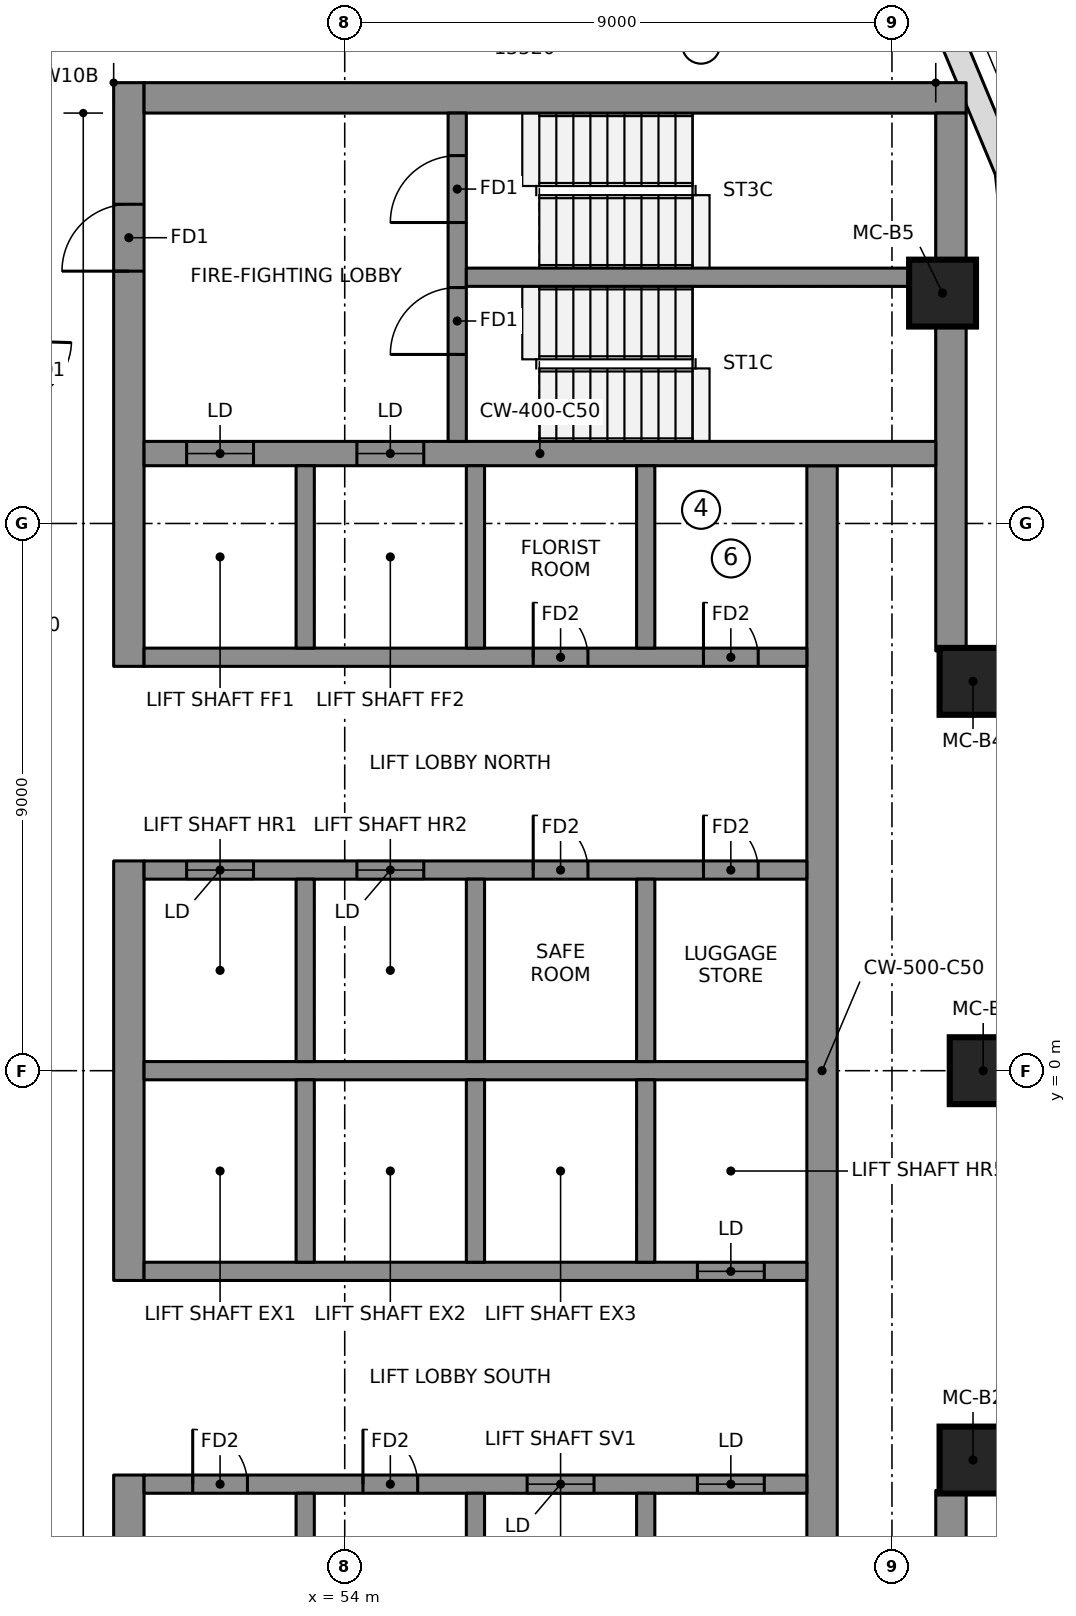
"""IFC4 building model, lengths in metres.
Left out: names, types, materials, properties, quantities, classifications, styles, units other than length and angle.
Written with IfcOpenShell. Run it as: python <this file> out.ifc"""

import sys

from ifc_helpers import new_model, si_unit, direction, frame, frame_2d, origin, origin_2d, place, context, subcontext, project, spatial, polyline, rectangle, outline, extrude, element, fill, save


model = new_model("IFC4")
c1 = context("Model", 3, precision=1e-05, world=origin(), true_north=direction((0.0, 1.0)))
c2 = subcontext(c1, "Body", "Model", "MODEL_VIEW")
j1 = project(units=[si_unit("LENGTHUNIT", "METRE"), si_unit("PLANEANGLEUNIT", "RADIAN")], contexts=[c1])
p1 = place(None, origin())
s1 = spatial("IfcSite", under=j1, at=p1, CompositionType="ELEMENT")
p2 = place(p1, origin())
s2 = spatial("IfcBuilding", under=s1, at=p2, CompositionType="ELEMENT")
p3 = place(p2, frame((0.0, 0.0, 296.3)))
s3 = spatial("IfcBuildingStorey", under=s2, at=p3, CompositionType="ELEMENT", Elevation=296.3)
p4 = place(p3, frame((50.45, 6.65, 0.0), z_axis=(0.0, 0.0, 1.0), x_axis=(0.0, 1.0, 0.0)))
e1 = element("IfcWall", 1, at=p4, inside=s3, PredefinedType="SHEAR", context=c2, shape_type="SweptSolid", body=[
    extrude(rectangle(XDim=9.6, YDim=0.5, at=frame_2d((4.8, 0.0))), origin(), (0.0, 0.0, 1.0), 3.55),
])
p5 = place(p4, frame((6.5, 0.0, 0.0)))
e2 = element("IfcOpeningElement", 2, at=p5, cuts=e1, PredefinedType="OPENING", context=c2, shape_type="SweptSolid", body=[
    extrude(rectangle(XDim=1.1, YDim=2.1, at=frame_2d((0.55, 1.05))), frame((0.0, 0.26, 0.0), z_axis=(0.0, -1.0, 0.0), x_axis=(1.0, 0.0, 0.0)), (0.0, 0.0, 1.0), 0.52),
])
p6 = place(p3, frame((50.45, -3.45, 0.0), z_axis=(0.0, 0.0, 1.0), x_axis=(0.0, 1.0, 0.0)))
e3 = element("IfcWall", 3, at=p6, inside=s3, PredefinedType="SHEAR", context=c2, shape_type="SweptSolid", body=[
    extrude(rectangle(XDim=6.9, YDim=0.5, at=frame_2d((3.45, 0.0))), origin(), (0.0, 0.0, 1.0), 3.55),
])
p7 = place(p3, frame((50.45, -16.25, 0.0), z_axis=(0.0, 0.0, 1.0), x_axis=(0.0, 1.0, 0.0)))
e4 = element("IfcWall", 4, at=p7, inside=s3, PredefinedType="SHEAR", context=c2, shape_type="SweptSolid", body=[
    extrude(rectangle(XDim=9.6, YDim=0.5, at=frame_2d((4.8, 0.0))), origin(), (0.0, 0.0, 1.0), 3.55),
])
p8 = place(p7, frame((2.0, 0.0, 0.0)))
e5 = element("IfcOpeningElement", 5, at=p8, cuts=e4, PredefinedType="OPENING", context=c2, shape_type="SweptSolid", body=[
    extrude(rectangle(XDim=1.1, YDim=2.1, at=frame_2d((0.55, 1.05))), frame((0.0, 0.26, 0.0), z_axis=(0.0, -1.0, 0.0), x_axis=(1.0, 0.0, 0.0)), (0.0, 0.0, 1.0), 0.52),
])
p9 = place(p3, frame((50.7, 16.0, 0.0), z_axis=(0.0, 0.0, 1.0), x_axis=(1.0, 0.0, 0.0)))
e6 = element("IfcWall", 6, at=p9, inside=s3, PredefinedType="SHEAR", context=c2, shape_type="SweptSolid", body=[
    extrude(rectangle(XDim=13.52, YDim=0.5, at=frame_2d((6.76, 0.0))), origin(), (0.0, 0.0, 1.0), 3.55),
])
for number, where, z_axis, x_axis in (
    (7, (63.97, 6.903, 0.0), (0.0, 0.0, 1.0), (0.0, 1.0, 0.0)),
    (8, (63.97, -15.75, 0.0), (0.0, 0.0, 1.0), (0.0, 1.0, 0.0)),
):
    element("IfcWall", number, at=place(p3, frame(where, z_axis=z_axis, x_axis=x_axis)), inside=s3, PredefinedType="SHEAR", context=c2, shape_type="SweptSolid", body=[
        extrude(rectangle(XDim=8.847, YDim=0.5, at=frame_2d((4.423, 0.0))), origin(), (0.0, 0.0, 1.0), 3.55),
    ])
p10 = place(p3, frame((61.85, -9.95, 0.0), z_axis=(0.0, 0.0, 1.0), x_axis=(0.0, 1.0, 0.0)))
e9 = element("IfcWall", 9, at=p10, inside=s3, PredefinedType="SHEAR", context=c2, shape_type="SweptSolid", body=[
    extrude(rectangle(XDim=19.9, YDim=0.5, at=frame_2d((9.95, 0.0))), origin(), (0.0, 0.0, 1.0), 3.55),
])
p11 = place(p3, frame((50.7, 10.15, 0.0), z_axis=(0.0, 0.0, 1.0), x_axis=(1.0, 0.0, 0.0)))
e10 = element("IfcWall", 10, at=p11, inside=s3, PredefinedType="SHEAR", context=c2, shape_type="SweptSolid", body=[
    extrude(rectangle(XDim=13.02, YDim=0.4, at=frame_2d((6.51, 0.0))), origin(), (0.0, 0.0, 1.0), 3.55),
])
p12 = place(p11, frame((0.7, 0.0, 0.0)))
e11 = element("IfcOpeningElement", 11, at=p12, cuts=e10, PredefinedType="OPENING", context=c2, shape_type="SweptSolid", body=[
    extrude(rectangle(XDim=1.1, YDim=2.1, at=frame_2d((0.55, 1.05))), frame((0.0, 0.21, 0.0), z_axis=(0.0, -1.0, 0.0), x_axis=(1.0, 0.0, 0.0)), (0.0, 0.0, 1.0), 0.42),
])
p13 = place(p11, frame((3.5, 0.0, 0.0)))
e12 = element("IfcOpeningElement", 12, at=p13, cuts=e10, PredefinedType="OPENING", context=c2, shape_type="SweptSolid", body=[
    extrude(rectangle(XDim=1.1, YDim=2.1, at=frame_2d((0.55, 1.05))), frame((0.0, 0.21, 0.0), z_axis=(0.0, -1.0, 0.0), x_axis=(1.0, 0.0, 0.0)), (0.0, 0.0, 1.0), 0.42),
])
p14 = place(p3, frame((50.7, 0.0, 0.0), z_axis=(0.0, 0.0, 1.0), x_axis=(1.0, 0.0, 0.0)))
e13 = element("IfcWall", 13, at=p14, inside=s3, PredefinedType="SHEAR", context=c2, shape_type="SweptSolid", body=[
    extrude(rectangle(XDim=10.9, YDim=0.3, at=frame_2d((5.45, 0.0))), origin(), (0.0, 0.0, 1.0), 3.55),
])
p15 = place(p3, frame((50.7, 3.3, 0.0), z_axis=(0.0, 0.0, 1.0), x_axis=(1.0, 0.0, 0.0)))
e14 = element("IfcWall", 14, at=p15, inside=s3, PredefinedType="SHEAR", context=c2, shape_type="SweptSolid", body=[
    extrude(rectangle(XDim=10.9, YDim=0.3, at=frame_2d((5.45, 0.0))), origin(), (0.0, 0.0, 1.0), 3.55),
])
p16 = place(p15, frame((0.7, 0.0, 0.0)))
e15 = element("IfcOpeningElement", 15, at=p16, cuts=e14, PredefinedType="OPENING", context=c2, shape_type="SweptSolid", body=[
    extrude(rectangle(XDim=1.1, YDim=2.1, at=frame_2d((0.55, 1.05))), frame((0.0, 0.16, 0.0), z_axis=(0.0, -1.0, 0.0), x_axis=(1.0, 0.0, 0.0)), (0.0, 0.0, 1.0), 0.32),
])
p17 = place(p15, frame((3.5, 0.0, 0.0)))
e16 = element("IfcOpeningElement", 16, at=p17, cuts=e14, PredefinedType="OPENING", context=c2, shape_type="SweptSolid", body=[
    extrude(rectangle(XDim=1.1, YDim=2.1, at=frame_2d((0.55, 1.05))), frame((0.0, 0.16, 0.0), z_axis=(0.0, -1.0, 0.0), x_axis=(1.0, 0.0, 0.0)), (0.0, 0.0, 1.0), 0.32),
])
p18 = place(p15, frame((6.4, 0.0, 0.0)))
e17 = element("IfcOpeningElement", 17, at=p18, cuts=e14, PredefinedType="OPENING", context=c2, shape_type="SweptSolid", body=[
    extrude(rectangle(XDim=0.9, YDim=2.1, at=frame_2d((0.45, 1.05))), frame((0.0, 0.16, 0.0), z_axis=(0.0, -1.0, 0.0), x_axis=(1.0, 0.0, 0.0)), (0.0, 0.0, 1.0), 0.32),
])
p19 = place(p15, frame((9.2, 0.0, 0.0)))
e18 = element("IfcOpeningElement", 18, at=p19, cuts=e14, PredefinedType="OPENING", context=c2, shape_type="SweptSolid", body=[
    extrude(rectangle(XDim=0.9, YDim=2.1, at=frame_2d((0.45, 1.05))), frame((0.0, 0.16, 0.0), z_axis=(0.0, -1.0, 0.0), x_axis=(1.0, 0.0, 0.0)), (0.0, 0.0, 1.0), 0.32),
])
p20 = place(p3, frame((50.7, 6.8, 0.0), z_axis=(0.0, 0.0, 1.0), x_axis=(1.0, 0.0, 0.0)))
e19 = element("IfcWall", 19, at=p20, inside=s3, PredefinedType="SHEAR", context=c2, shape_type="SweptSolid", body=[
    extrude(rectangle(XDim=10.9, YDim=0.3, at=frame_2d((5.45, 0.0))), origin(), (0.0, 0.0, 1.0), 3.55),
])
p21 = place(p20, frame((6.4, 0.0, 0.0)))
e20 = element("IfcOpeningElement", 20, at=p21, cuts=e19, PredefinedType="OPENING", context=c2, shape_type="SweptSolid", body=[
    extrude(rectangle(XDim=0.9, YDim=2.1, at=frame_2d((0.45, 1.05))), frame((0.0, 0.16, 0.0), z_axis=(0.0, -1.0, 0.0), x_axis=(1.0, 0.0, 0.0)), (0.0, 0.0, 1.0), 0.32),
])
p22 = place(p20, frame((9.2, 0.0, 0.0)))
e21 = element("IfcOpeningElement", 21, at=p22, cuts=e19, PredefinedType="OPENING", context=c2, shape_type="SweptSolid", body=[
    extrude(rectangle(XDim=0.9, YDim=2.1, at=frame_2d((0.45, 1.05))), frame((0.0, 0.16, 0.0), z_axis=(0.0, -1.0, 0.0), x_axis=(1.0, 0.0, 0.0)), (0.0, 0.0, 1.0), 0.32),
])
for number, where, z_axis, x_axis in (
    (22, (53.35, 0.15, 0.0), (0.0, 0.0, 1.0), (0.0, 1.0, 0.0)),
    (23, (53.35, 6.95, 0.0), (0.0, 0.0, 1.0), (0.0, 1.0, 0.0)),
    (24, (56.15, 0.15, 0.0), (0.0, 0.0, 1.0), (0.0, 1.0, 0.0)),
    (25, (56.15, 6.95, 0.0), (0.0, 0.0, 1.0), (0.0, 1.0, 0.0)),
    (26, (58.95, 0.15, 0.0), (0.0, 0.0, 1.0), (0.0, 1.0, 0.0)),
    (27, (58.95, 6.95, 0.0), (0.0, 0.0, 1.0), (0.0, 1.0, 0.0)),
):
    element("IfcWall", number, at=place(p3, frame(where, z_axis=z_axis, x_axis=x_axis)), inside=s3, PredefinedType="SHEAR", context=c2, shape_type="SweptSolid", body=[
        extrude(rectangle(XDim=3.0, YDim=0.3, at=frame_2d((1.5, 0.0))), origin(), (0.0, 0.0, 1.0), 3.55),
    ])
p23 = place(p3, frame((50.7, -3.3, 0.0), z_axis=(0.0, 0.0, 1.0), x_axis=(1.0, 0.0, 0.0)))
e28 = element("IfcWall", 28, at=p23, inside=s3, PredefinedType="SHEAR", context=c2, shape_type="SweptSolid", body=[
    extrude(rectangle(XDim=10.9, YDim=0.3, at=frame_2d((5.45, 0.0))), origin(), (0.0, 0.0, 1.0), 3.55),
])
p24 = place(p23, frame((9.1, 0.0, 0.0)))
e29 = element("IfcOpeningElement", 29, at=p24, cuts=e28, PredefinedType="OPENING", context=c2, shape_type="SweptSolid", body=[
    extrude(rectangle(XDim=1.1, YDim=2.1, at=frame_2d((0.55, 1.05))), frame((0.0, 0.16, 0.0), z_axis=(0.0, -1.0, 0.0), x_axis=(1.0, 0.0, 0.0)), (0.0, 0.0, 1.0), 0.32),
])
p25 = place(p3, frame((50.7, -6.8, 0.0), z_axis=(0.0, 0.0, 1.0), x_axis=(1.0, 0.0, 0.0)))
e30 = element("IfcWall", 30, at=p25, inside=s3, PredefinedType="SHEAR", context=c2, shape_type="SweptSolid", body=[
    extrude(rectangle(XDim=10.9, YDim=0.3, at=frame_2d((5.45, 0.0))), origin(), (0.0, 0.0, 1.0), 3.55),
])
p26 = place(p25, frame((6.3, 0.0, 0.0)))
e31 = element("IfcOpeningElement", 31, at=p26, cuts=e30, PredefinedType="OPENING", context=c2, shape_type="SweptSolid", body=[
    extrude(rectangle(XDim=1.1, YDim=2.1, at=frame_2d((0.55, 1.05))), frame((0.0, 0.16, 0.0), z_axis=(0.0, -1.0, 0.0), x_axis=(1.0, 0.0, 0.0)), (0.0, 0.0, 1.0), 0.32),
])
p27 = place(p25, frame((9.1, 0.0, 0.0)))
e32 = element("IfcOpeningElement", 32, at=p27, cuts=e30, PredefinedType="OPENING", context=c2, shape_type="SweptSolid", body=[
    extrude(rectangle(XDim=1.1, YDim=2.1, at=frame_2d((0.55, 1.05))), frame((0.0, 0.16, 0.0), z_axis=(0.0, -1.0, 0.0), x_axis=(1.0, 0.0, 0.0)), (0.0, 0.0, 1.0), 0.32),
])
p28 = place(p25, frame((0.8, 0.0, 0.0)))
e33 = element("IfcOpeningElement", 33, at=p28, cuts=e30, PredefinedType="OPENING", context=c2, shape_type="SweptSolid", body=[
    extrude(rectangle(XDim=0.9, YDim=2.1, at=frame_2d((0.45, 1.05))), frame((0.0, 0.16, 0.0), z_axis=(0.0, -1.0, 0.0), x_axis=(1.0, 0.0, 0.0)), (0.0, 0.0, 1.0), 0.32),
])
p29 = place(p25, frame((3.6, 0.0, 0.0)))
e34 = element("IfcOpeningElement", 34, at=p29, cuts=e30, PredefinedType="OPENING", context=c2, shape_type="SweptSolid", body=[
    extrude(rectangle(XDim=0.9, YDim=2.1, at=frame_2d((0.45, 1.05))), frame((0.0, 0.16, 0.0), z_axis=(0.0, -1.0, 0.0), x_axis=(1.0, 0.0, 0.0)), (0.0, 0.0, 1.0), 0.32),
])
for number, where, z_axis, x_axis in (
    (35, (53.35, -3.15, 0.0), (0.0, 0.0, 1.0), (0.0, 1.0, 0.0)),
    (36, (53.35, -9.95, 0.0), (0.0, 0.0, 1.0), (0.0, 1.0, 0.0)),
    (37, (56.15, -3.15, 0.0), (0.0, 0.0, 1.0), (0.0, 1.0, 0.0)),
    (38, (56.15, -9.95, 0.0), (0.0, 0.0, 1.0), (0.0, 1.0, 0.0)),
    (39, (58.95, -3.15, 0.0), (0.0, 0.0, 1.0), (0.0, 1.0, 0.0)),
    (40, (58.95, -9.95, 0.0), (0.0, 0.0, 1.0), (0.0, 1.0, 0.0)),
):
    element("IfcWall", number, at=place(p3, frame(where, z_axis=z_axis, x_axis=x_axis)), inside=s3, PredefinedType="SHEAR", context=c2, shape_type="SweptSolid", body=[
        extrude(rectangle(XDim=3.0, YDim=0.3, at=frame_2d((1.5, 0.0))), origin(), (0.0, 0.0, 1.0), 3.55),
    ])
p30 = place(p3, frame((55.85, 10.35, 0.0), z_axis=(0.0, 0.0, 1.0), x_axis=(0.0, 1.0, 0.0)))
e41 = element("IfcWall", 41, at=p30, inside=s3, PredefinedType="SHEAR", context=c2, shape_type="SweptSolid", body=[
    extrude(rectangle(XDim=5.4, YDim=0.3, at=frame_2d((2.7, 0.0))), origin(), (0.0, 0.0, 1.0), 3.55),
])
p31 = place(p30, frame((1.43, 0.0, 0.0)))
e42 = element("IfcOpeningElement", 42, at=p31, cuts=e41, PredefinedType="OPENING", context=c2, shape_type="SweptSolid", body=[
    extrude(rectangle(XDim=1.1, YDim=2.1, at=frame_2d((0.55, 1.05))), frame((0.0, 0.16, 0.0), z_axis=(0.0, -1.0, 0.0), x_axis=(1.0, 0.0, 0.0)), (0.0, 0.0, 1.0), 0.32),
])
p32 = place(p30, frame((3.6, 0.0, 0.0)))
e43 = element("IfcOpeningElement", 43, at=p32, cuts=e41, PredefinedType="OPENING", context=c2, shape_type="SweptSolid", body=[
    extrude(rectangle(XDim=1.1, YDim=2.1, at=frame_2d((0.55, 1.05))), frame((0.0, 0.16, 0.0), z_axis=(0.0, -1.0, 0.0), x_axis=(1.0, 0.0, 0.0)), (0.0, 0.0, 1.0), 0.32),
])
p33 = place(p3, frame((56.0, 13.05, 0.0), z_axis=(0.0, 0.0, 1.0), x_axis=(1.0, 0.0, 0.0)))
e44 = element("IfcWall", 44, at=p33, inside=s3, PredefinedType="SHEAR", context=c2, shape_type="SweptSolid", body=[
    extrude(rectangle(XDim=7.72, YDim=0.3, at=frame_2d((3.86, 0.0))), origin(), (0.0, 0.0, 1.0), 3.55),
])
for number, where, z_axis, x_axis in (
    (45, (64.333, -6.403, 0.0), (0.0, 0.0, 1.0), (1.0, 0.0, 0.0)),
    (46, (64.5, 0.0, 0.0), (0.0, 0.0, 1.0), (1.0, 0.0, 0.0)),
    (47, (64.333, 6.403, 0.0), (0.0, 0.0, 1.0), (1.0, 0.0, 0.0)),
    (48, (63.832, 12.789, 0.0), (0.0, 0.0, 1.0), (1.0, 0.0, 0.0)),
):
    element("IfcColumn", number, at=place(p3, frame(where, z_axis=z_axis, x_axis=x_axis)), inside=s3, PredefinedType="COLUMN", context=c2, shape_type="SweptSolid", body=[
        extrude(rectangle(XDim=1.1, YDim=1.1, at=origin_2d()), origin(), (0.0, 0.0, 1.0), 3.55),
    ])
p34 = place(p3, frame((65.331, 10.571, 0.0), z_axis=(0.0, 0.0, 1.0), x_axis=(-0.102249826987, 0.994758751096, 0.0)))
e49 = element("IfcWall", 49, at=p34, inside=s3, PredefinedType="NOTDEFINED", context=c2, shape_type="SweptSolid", body=[
    extrude(outline(polyline([(-0.003, -0.2), (4.263, -0.2), (4.204, 0.2), (0.003, 0.2), (-0.003, -0.2)])), origin(), (0.0, 0.0, 1.0), 3.25),
])
p35 = place(p3, frame((64.898, 14.782, 0.0), z_axis=(0.0, 0.0, 1.0), x_axis=(-0.385285857918, 0.922797273343, 0.0)))
e50 = element("IfcWall", 50, at=p35, inside=s3, PredefinedType="NOTDEFINED", context=c2, shape_type="SweptSolid", body=[
    extrude(outline(polyline([(-0.03, -0.2), (3.753, -0.2), (3.64, 0.2), (0.03, 0.2), (-0.03, -0.2)])), origin(), (0.0, 0.0, 1.0), 3.25),
])
p36 = place(p12, origin())
e51 = element("IfcDoor", 51, at=p36, inside=s3, OperationType="DOUBLE_DOOR_SLIDING", PredefinedType="DOOR", context=c2, shape_type="SweptSolid", body=[
    extrude(rectangle(XDim=1.1, YDim=2.1, at=frame_2d((0.55, 1.05))), frame((0.0, 0.025, 0.0), z_axis=(0.0, -1.0, 0.0), x_axis=(1.0, 0.0, 0.0)), (0.0, 0.0, 1.0), 0.05),
])
fill(e11, e51)
p37 = place(p13, origin())
e52 = element("IfcDoor", 52, at=p37, inside=s3, OperationType="DOUBLE_DOOR_SLIDING", PredefinedType="DOOR", context=c2, shape_type="SweptSolid", body=[
    extrude(rectangle(XDim=1.1, YDim=2.1, at=frame_2d((0.55, 1.05))), frame((0.0, 0.025, 0.0), z_axis=(0.0, -1.0, 0.0), x_axis=(1.0, 0.0, 0.0)), (0.0, 0.0, 1.0), 0.05),
])
fill(e12, e52)
p38 = place(p16, origin())
e53 = element("IfcDoor", 53, at=p38, inside=s3, OperationType="DOUBLE_DOOR_SLIDING", PredefinedType="DOOR", context=c2, shape_type="SweptSolid", body=[
    extrude(rectangle(XDim=1.1, YDim=2.1, at=frame_2d((0.55, 1.05))), frame((0.0, 0.025, 0.0), z_axis=(0.0, -1.0, 0.0), x_axis=(1.0, 0.0, 0.0)), (0.0, 0.0, 1.0), 0.05),
])
fill(e15, e53)
p39 = place(p17, origin())
e54 = element("IfcDoor", 54, at=p39, inside=s3, OperationType="DOUBLE_DOOR_SLIDING", PredefinedType="DOOR", context=c2, shape_type="SweptSolid", body=[
    extrude(rectangle(XDim=1.1, YDim=2.1, at=frame_2d((0.55, 1.05))), frame((0.0, 0.025, 0.0), z_axis=(0.0, -1.0, 0.0), x_axis=(1.0, 0.0, 0.0)), (0.0, 0.0, 1.0), 0.05),
])
fill(e16, e54)
p40 = place(p24, origin())
e55 = element("IfcDoor", 55, at=p40, inside=s3, OperationType="DOUBLE_DOOR_SLIDING", PredefinedType="DOOR", context=c2, shape_type="SweptSolid", body=[
    extrude(rectangle(XDim=1.1, YDim=2.1, at=frame_2d((0.55, 1.05))), frame((0.0, 0.025, 0.0), z_axis=(0.0, -1.0, 0.0), x_axis=(1.0, 0.0, 0.0)), (0.0, 0.0, 1.0), 0.05),
])
fill(e29, e55)
p41 = place(p26, origin())
e56 = element("IfcDoor", 56, at=p41, inside=s3, OperationType="DOUBLE_DOOR_SLIDING", PredefinedType="DOOR", context=c2, shape_type="SweptSolid", body=[
    extrude(rectangle(XDim=1.1, YDim=2.1, at=frame_2d((0.55, 1.05))), frame((0.0, 0.025, 0.0), z_axis=(0.0, -1.0, 0.0), x_axis=(1.0, 0.0, 0.0)), (0.0, 0.0, 1.0), 0.05),
])
fill(e31, e56)
p42 = place(p27, origin())
e57 = element("IfcDoor", 57, at=p42, inside=s3, OperationType="DOUBLE_DOOR_SLIDING", PredefinedType="DOOR", context=c2, shape_type="SweptSolid", body=[
    extrude(rectangle(XDim=1.1, YDim=2.1, at=frame_2d((0.55, 1.05))), frame((0.0, 0.025, 0.0), z_axis=(0.0, -1.0, 0.0), x_axis=(1.0, 0.0, 0.0)), (0.0, 0.0, 1.0), 0.05),
])
fill(e32, e57)
p43 = place(p31, origin())
e58 = element("IfcDoor", 58, at=p43, inside=s3, OperationType="SINGLE_SWING_RIGHT", PredefinedType="DOOR", context=c2, shape_type="SweptSolid", body=[
    extrude(rectangle(XDim=1.1, YDim=2.1, at=frame_2d((0.55, 1.05))), frame((0.0, 0.025, 0.0), z_axis=(0.0, -1.0, 0.0), x_axis=(1.0, 0.0, 0.0)), (0.0, 0.0, 1.0), 0.05),
])
fill(e42, e58)
p44 = place(p32, origin())
e59 = element("IfcDoor", 59, at=p44, inside=s3, OperationType="SINGLE_SWING_RIGHT", PredefinedType="DOOR", context=c2, shape_type="SweptSolid", body=[
    extrude(rectangle(XDim=1.1, YDim=2.1, at=frame_2d((0.55, 1.05))), frame((0.0, 0.025, 0.0), z_axis=(0.0, -1.0, 0.0), x_axis=(1.0, 0.0, 0.0)), (0.0, 0.0, 1.0), 0.05),
])
fill(e43, e59)
p45 = place(p5, origin())
e60 = element("IfcDoor", 60, at=p45, inside=s3, OperationType="SINGLE_SWING_RIGHT", PredefinedType="DOOR", context=c2, shape_type="SweptSolid", body=[
    extrude(rectangle(XDim=1.1, YDim=2.1, at=frame_2d((0.55, 1.05))), frame((0.0, 0.025, 0.0), z_axis=(0.0, -1.0, 0.0), x_axis=(1.0, 0.0, 0.0)), (0.0, 0.0, 1.0), 0.05),
])
fill(e2, e60)
p46 = place(p21, origin())
e61 = element("IfcDoor", 61, at=p46, inside=s3, OperationType="SINGLE_SWING_LEFT", PredefinedType="DOOR", context=c2, shape_type="SweptSolid", body=[
    extrude(rectangle(XDim=0.9, YDim=2.1, at=frame_2d((0.45, 1.05))), frame((0.0, 0.025, 0.0), z_axis=(0.0, -1.0, 0.0), x_axis=(1.0, 0.0, 0.0)), (0.0, 0.0, 1.0), 0.05),
])
fill(e20, e61)
p47 = place(p22, origin())
e62 = element("IfcDoor", 62, at=p47, inside=s3, OperationType="SINGLE_SWING_LEFT", PredefinedType="DOOR", context=c2, shape_type="SweptSolid", body=[
    extrude(rectangle(XDim=0.9, YDim=2.1, at=frame_2d((0.45, 1.05))), frame((0.0, 0.025, 0.0), z_axis=(0.0, -1.0, 0.0), x_axis=(1.0, 0.0, 0.0)), (0.0, 0.0, 1.0), 0.05),
])
fill(e21, e62)
p48 = place(p18, origin())
e63 = element("IfcDoor", 63, at=p48, inside=s3, OperationType="SINGLE_SWING_LEFT", PredefinedType="DOOR", context=c2, shape_type="SweptSolid", body=[
    extrude(rectangle(XDim=0.9, YDim=2.1, at=frame_2d((0.45, 1.05))), frame((0.0, 0.025, 0.0), z_axis=(0.0, -1.0, 0.0), x_axis=(1.0, 0.0, 0.0)), (0.0, 0.0, 1.0), 0.05),
])
fill(e17, e63)
p49 = place(p19, origin())
e64 = element("IfcDoor", 64, at=p49, inside=s3, OperationType="SINGLE_SWING_LEFT", PredefinedType="DOOR", context=c2, shape_type="SweptSolid", body=[
    extrude(rectangle(XDim=0.9, YDim=2.1, at=frame_2d((0.45, 1.05))), frame((0.0, 0.025, 0.0), z_axis=(0.0, -1.0, 0.0), x_axis=(1.0, 0.0, 0.0)), (0.0, 0.0, 1.0), 0.05),
])
fill(e18, e64)
p50 = place(p28, origin())
e65 = element("IfcDoor", 65, at=p50, inside=s3, OperationType="SINGLE_SWING_LEFT", PredefinedType="DOOR", context=c2, shape_type="SweptSolid", body=[
    extrude(rectangle(XDim=0.9, YDim=2.1, at=frame_2d((0.45, 1.05))), frame((0.0, 0.025, 0.0), z_axis=(0.0, -1.0, 0.0), x_axis=(1.0, 0.0, 0.0)), (0.0, 0.0, 1.0), 0.05),
])
fill(e33, e65)
p51 = place(p29, origin())
e66 = element("IfcDoor", 66, at=p51, inside=s3, OperationType="SINGLE_SWING_LEFT", PredefinedType="DOOR", context=c2, shape_type="SweptSolid", body=[
    extrude(rectangle(XDim=0.9, YDim=2.1, at=frame_2d((0.45, 1.05))), frame((0.0, 0.025, 0.0), z_axis=(0.0, -1.0, 0.0), x_axis=(1.0, 0.0, 0.0)), (0.0, 0.0, 1.0), 0.05),
])
fill(e34, e66)
save(model, sys.argv[1])
